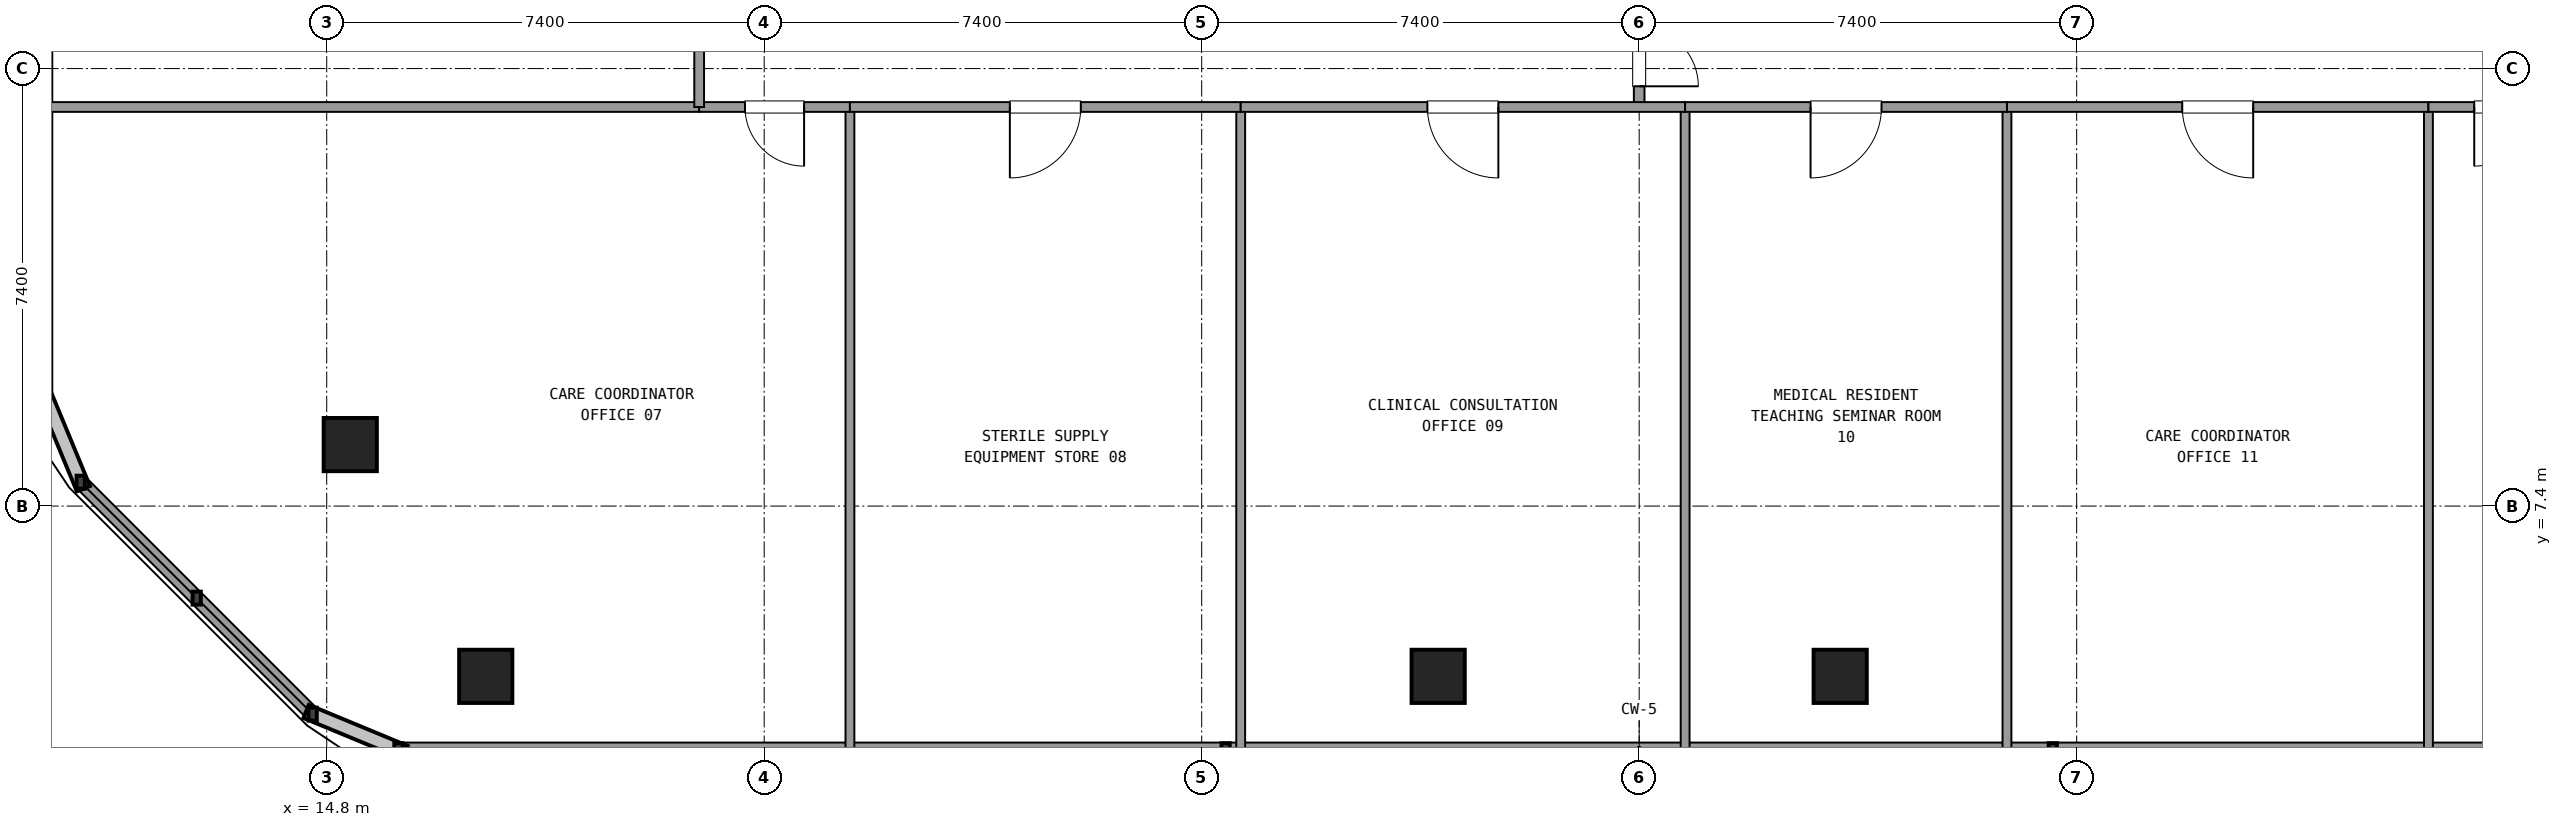
"""IFC4 building model, lengths in metres.
Left out: names, types, materials, properties, quantities, classifications, styles, units other than length and angle.
Written with IfcOpenShell. Run it as: python <this file> out.ifc"""

import sys

from ifc_helpers import new_model, si_unit, direction, frame, frame_2d, origin, origin_2d, place, context, subcontext, project, spatial, rectangle, extrude, element, fill, save


model = new_model("IFC4")
c1 = context("Model", 3, precision=1e-05, world=origin(), true_north=direction((0.0, 1.0)))
c2 = subcontext(c1, "Body", "Model", "MODEL_VIEW")
j1 = project(units=[si_unit("LENGTHUNIT", "METRE"), si_unit("PLANEANGLEUNIT", "RADIAN")], contexts=[c1])
p1 = place(None, origin())
s1 = spatial("IfcSite", under=j1, at=p1, CompositionType="ELEMENT")
p2 = place(p1, origin())
s2 = spatial("IfcBuilding", under=s1, at=p2, CompositionType="ELEMENT")
p3 = place(p2, frame((0.0, 0.0, 225.18)))
s3 = spatial("IfcBuildingStorey", under=s2, at=p3, CompositionType="ELEMENT", Elevation=225.18)
for number, where, z_axis, x_axis in (
    (1, (15.198, 8.44, 0.0), (0.0, 0.0, 1.0), (1.0, 0.0, 0.0)),
    (2, (17.49, 4.52, 0.0), (0.0, 0.0, 1.0), (1.0, 0.0, 0.0)),
    (3, (33.6, 4.52, 0.0), (0.0, 0.0, 1.0), (1.0, 0.0, 0.0)),
    (4, (40.4, 4.52, 0.0), (0.0, 0.0, 1.0), (1.0, 0.0, 0.0)),
):
    element("IfcColumn", number, at=place(p3, frame(where, z_axis=z_axis, x_axis=x_axis)), inside=s3, PredefinedType="COLUMN", context=c2, shape_type="SweptSolid", body=[
        extrude(rectangle(XDim=0.9, YDim=0.9, at=origin_2d()), origin(), (0.0, 0.0, 1.0), 3.6),
    ])
p4 = place(p3, frame((16.013, 3.28, 0.0), z_axis=(0.0, 0.0, 1.0), x_axis=(1.0, 0.0, 0.0)))
e5 = element("IfcWall", 5, at=p4, inside=s3, PredefinedType="SOLIDWALL", context=c2, shape_type="SweptSolid", body=[
    extrude(rectangle(XDim=41.974, YDim=0.24, at=frame_2d((20.987, 0.0))), origin(), (0.0, 0.0, 1.0), 0.85),
])
p5 = place(p3, frame((10.038, 42.545, 0.0), z_axis=(0.0, 0.0, 1.0), x_axis=(0.0, -1.0, 0.0)))
e6 = element("IfcWall", 6, at=p5, inside=s3, PredefinedType="SOLIDWALL", context=c2, shape_type="SweptSolid", body=[
    extrude(rectangle(XDim=33.29, YDim=0.24, at=frame_2d((16.645, 0.0))), origin(), (0.0, 0.0, 1.0), 0.85),
])
p6 = place(p3, frame((10.639, 7.804, 0.0), z_axis=(0.0, 0.0, 1.0), x_axis=(0.707128783731, -0.707084777957, 0.0)))
e7 = element("IfcWall", 7, at=p6, inside=s3, PredefinedType="SOLIDWALL", context=c2, shape_type="SweptSolid", body=[
    extrude(rectangle(XDim=5.548, YDim=0.24, at=frame_2d((2.774, 0.0))), origin(), (0.0, 0.0, 1.0), 0.85),
])
p7 = place(p3, frame((37.0, 14.15, 0.0), z_axis=(0.0, 0.0, 1.0), x_axis=(0.0, 1.0, 0.0)))
e8 = element("IfcWall", 8, at=p7, inside=s3, PredefinedType="PARTITIONING", context=c2, shape_type="SweptSolid", body=[
    extrude(rectangle(XDim=2.7, YDim=0.18, at=frame_2d((1.35, 0.0))), origin(), (0.0, 0.0, 1.0), 2.61),
])
p8 = place(p7, frame((0.35, 0.0, 0.0)))
e9 = element("IfcOpeningElement", 9, at=p8, cuts=e8, PredefinedType="OPENING", context=c2, shape_type="SweptSolid", body=[
    extrude(rectangle(XDim=2.0, YDim=2.2, at=frame_2d((1.0, 1.1))), frame((0.0, 0.1, 0.0), z_axis=(0.0, -1.0, 0.0), x_axis=(1.0, 0.0, 0.0)), (0.0, 0.0, 1.0), 0.2),
])
p9 = place(p3, frame((10.058, 14.15, 0.0), z_axis=(0.0, 0.0, 1.0), x_axis=(1.0, 0.0, 0.0)))
e10 = element("IfcWall", 10, at=p9, inside=s3, PredefinedType="PARTITIONING", context=c2, shape_type="SweptSolid", body=[
    extrude(rectangle(XDim=11.042, YDim=0.165, at=frame_2d((5.521, 0.0))), origin(), (0.0, 0.0, 1.0), 2.61),
])
p10 = place(p3, frame((23.65, 14.15, 0.0), z_axis=(0.0, 0.0, 1.0), x_axis=(0.0, -1.0, 0.0)))
e11 = element("IfcWall", 11, at=p10, inside=s3, PredefinedType="PARTITIONING", context=c2, shape_type="SweptSolid", body=[
    extrude(rectangle(XDim=10.85, YDim=0.15, at=frame_2d((5.425, 0.0))), origin(), (0.0, 0.0, 1.0), 2.61),
])
p11 = place(p3, frame((21.1, 14.15, 0.0), z_axis=(0.0, 0.0, 1.0), x_axis=(1.0, 0.0, 0.0)))
e12 = element("IfcWall", 12, at=p11, inside=s3, PredefinedType="PARTITIONING", context=c2, shape_type="SweptSolid", body=[
    extrude(rectangle(XDim=2.55, YDim=0.165, at=frame_2d((1.275, 0.0))), origin(), (0.0, 0.0, 1.0), 2.61),
])
p12 = place(p11, frame((0.775, 0.0, 0.0)))
e13 = element("IfcOpeningElement", 13, at=p12, cuts=e12, PredefinedType="OPENING", context=c2, shape_type="SweptSolid", body=[
    extrude(rectangle(XDim=1.0, YDim=2.15, at=frame_2d((0.5, 1.075))), frame((0.0, 0.093, 0.0), z_axis=(0.0, -1.0, 0.0), x_axis=(1.0, 0.0, 0.0)), (0.0, 0.0, 1.0), 0.185),
])
p13 = place(p3, frame((30.26, 14.15, 0.0), z_axis=(0.0, 0.0, 1.0), x_axis=(0.0, -1.0, 0.0)))
e14 = element("IfcWall", 14, at=p13, inside=s3, PredefinedType="PARTITIONING", context=c2, shape_type="SweptSolid", body=[
    extrude(rectangle(XDim=10.85, YDim=0.15, at=frame_2d((5.425, 0.0))), origin(), (0.0, 0.0, 1.0), 2.61),
])
p14 = place(p3, frame((23.65, 14.15, 0.0), z_axis=(0.0, 0.0, 1.0), x_axis=(1.0, 0.0, 0.0)))
e15 = element("IfcWall", 15, at=p14, inside=s3, PredefinedType="PARTITIONING", context=c2, shape_type="SweptSolid", body=[
    extrude(rectangle(XDim=6.61, YDim=0.165, at=frame_2d((3.305, 0.0))), origin(), (0.0, 0.0, 1.0), 2.61),
])
p15 = place(p14, frame((2.705, 0.0, 0.0)))
e16 = element("IfcOpeningElement", 16, at=p15, cuts=e15, PredefinedType="OPENING", context=c2, shape_type="SweptSolid", body=[
    extrude(rectangle(XDim=1.2, YDim=2.15, at=frame_2d((0.6, 1.075))), frame((0.0, 0.093, 0.0), z_axis=(0.0, -1.0, 0.0), x_axis=(1.0, 0.0, 0.0)), (0.0, 0.0, 1.0), 0.185),
])
p16 = place(p3, frame((37.777, 14.15, 0.0), z_axis=(0.0, 0.0, 1.0), x_axis=(0.0, -1.0, 0.0)))
e17 = element("IfcWall", 17, at=p16, inside=s3, PredefinedType="PARTITIONING", context=c2, shape_type="SweptSolid", body=[
    extrude(rectangle(XDim=10.85, YDim=0.15, at=frame_2d((5.425, 0.0))), origin(), (0.0, 0.0, 1.0), 2.61),
])
p17 = place(p3, frame((30.26, 14.15, 0.0), z_axis=(0.0, 0.0, 1.0), x_axis=(1.0, 0.0, 0.0)))
e18 = element("IfcWall", 18, at=p17, inside=s3, PredefinedType="PARTITIONING", context=c2, shape_type="SweptSolid", body=[
    extrude(rectangle(XDim=7.517, YDim=0.165, at=frame_2d((3.759, 0.0))), origin(), (0.0, 0.0, 1.0), 2.61),
])
p18 = place(p17, frame((3.158, 0.0, 0.0)))
e19 = element("IfcOpeningElement", 19, at=p18, cuts=e18, PredefinedType="OPENING", context=c2, shape_type="SweptSolid", body=[
    extrude(rectangle(XDim=1.2, YDim=2.15, at=frame_2d((0.6, 1.075))), frame((0.0, 0.093, 0.0), z_axis=(0.0, -1.0, 0.0), x_axis=(1.0, 0.0, 0.0)), (0.0, 0.0, 1.0), 0.185),
])
p19 = place(p3, frame((43.221, 14.15, 0.0), z_axis=(0.0, 0.0, 1.0), x_axis=(0.0, -1.0, 0.0)))
e20 = element("IfcWall", 20, at=p19, inside=s3, PredefinedType="PARTITIONING", context=c2, shape_type="SweptSolid", body=[
    extrude(rectangle(XDim=10.85, YDim=0.15, at=frame_2d((5.425, 0.0))), origin(), (0.0, 0.0, 1.0), 2.61),
])
p20 = place(p3, frame((37.777, 14.15, 0.0), z_axis=(0.0, 0.0, 1.0), x_axis=(1.0, 0.0, 0.0)))
e21 = element("IfcWall", 21, at=p20, inside=s3, PredefinedType="PARTITIONING", context=c2, shape_type="SweptSolid", body=[
    extrude(rectangle(XDim=5.444, YDim=0.165, at=frame_2d((2.722, 0.0))), origin(), (0.0, 0.0, 1.0), 2.61),
])
p21 = place(p20, frame((2.122, 0.0, 0.0)))
e22 = element("IfcOpeningElement", 22, at=p21, cuts=e21, PredefinedType="OPENING", context=c2, shape_type="SweptSolid", body=[
    extrude(rectangle(XDim=1.2, YDim=2.15, at=frame_2d((0.6, 1.075))), frame((0.0, 0.093, 0.0), z_axis=(0.0, -1.0, 0.0), x_axis=(1.0, 0.0, 0.0)), (0.0, 0.0, 1.0), 0.185),
])
p22 = place(p3, frame((50.35, 14.15, 0.0), z_axis=(0.0, 0.0, 1.0), x_axis=(0.0, -1.0, 0.0)))
e23 = element("IfcWall", 23, at=p22, inside=s3, PredefinedType="PARTITIONING", context=c2, shape_type="SweptSolid", body=[
    extrude(rectangle(XDim=10.85, YDim=0.15, at=frame_2d((5.425, 0.0))), origin(), (0.0, 0.0, 1.0), 2.61),
])
p23 = place(p3, frame((43.221, 14.15, 0.0), z_axis=(0.0, 0.0, 1.0), x_axis=(1.0, 0.0, 0.0)))
e24 = element("IfcWall", 24, at=p23, inside=s3, PredefinedType="PARTITIONING", context=c2, shape_type="SweptSolid", body=[
    extrude(rectangle(XDim=7.129, YDim=0.165, at=frame_2d((3.564, 0.0))), origin(), (0.0, 0.0, 1.0), 2.61),
])
p24 = place(p23, frame((2.965, 0.0, 0.0)))
e25 = element("IfcOpeningElement", 25, at=p24, cuts=e24, PredefinedType="OPENING", context=c2, shape_type="SweptSolid", body=[
    extrude(rectangle(XDim=1.2, YDim=2.15, at=frame_2d((0.6, 1.075))), frame((0.0, 0.093, 0.0), z_axis=(0.0, -1.0, 0.0), x_axis=(1.0, 0.0, 0.0)), (0.0, 0.0, 1.0), 0.185),
])
p25 = place(p3, frame((50.35, 14.15, 0.0), z_axis=(0.0, 0.0, 1.0), x_axis=(1.0, 0.0, 0.0)))
e26 = element("IfcWall", 26, at=p25, inside=s3, PredefinedType="PARTITIONING", context=c2, shape_type="SweptSolid", body=[
    extrude(rectangle(XDim=2.55, YDim=0.165, at=frame_2d((1.275, 0.0))), origin(), (0.0, 0.0, 1.0), 2.61),
])
p26 = place(p25, frame((0.775, 0.0, 0.0)))
e27 = element("IfcOpeningElement", 27, at=p26, cuts=e26, PredefinedType="OPENING", context=c2, shape_type="SweptSolid", body=[
    extrude(rectangle(XDim=1.0, YDim=2.15, at=frame_2d((0.5, 1.075))), frame((0.0, 0.093, 0.0), z_axis=(0.0, -1.0, 0.0), x_axis=(1.0, 0.0, 0.0)), (0.0, 0.0, 1.0), 0.185),
])
p27 = place(p3, frame((21.1, 14.15, 0.0), z_axis=(0.0, 0.0, 1.0), x_axis=(0.0, 1.0, 0.0)))
e28 = element("IfcWall", 28, at=p27, inside=s3, PredefinedType="PARTITIONING", context=c2, shape_type="SweptSolid", body=[
    extrude(rectangle(XDim=10.34, YDim=0.165, at=frame_2d((5.17, 0.0))), origin(), (0.0, 0.0, 1.0), 2.61),
])
p28 = place(p27, frame((4.57, 0.0, 0.0)))
e29 = element("IfcOpeningElement", 29, at=p28, cuts=e28, PredefinedType="OPENING", context=c2, shape_type="SweptSolid", body=[
    extrude(rectangle(XDim=1.2, YDim=2.15, at=frame_2d((0.6, 1.075))), frame((0.0, 0.093, 0.0), z_axis=(0.0, -1.0, 0.0), x_axis=(1.0, 0.0, 0.0)), (0.0, 0.0, 1.0), 0.185),
])
p29 = place(p8, frame((2.0, 0.0, 0.0), z_axis=(0.0, 0.0, 1.0), x_axis=(-1.0, 0.0, 0.0)))
e30 = element("IfcDoor", 30, at=p29, inside=s3, OperationType="DOUBLE_DOOR_SINGLE_SWING", PredefinedType="DOOR", context=c2, shape_type="SweptSolid", body=[
    extrude(rectangle(XDim=2.0, YDim=2.2, at=frame_2d((1.0, 1.1))), frame((0.0, 0.025, 0.0), z_axis=(0.0, -1.0, 0.0), x_axis=(1.0, 0.0, 0.0)), (0.0, 0.0, 1.0), 0.05),
])
fill(e9, e30)
p30 = place(p12, frame((1.0, 0.0, 0.0), z_axis=(0.0, 0.0, 1.0), x_axis=(-1.0, 0.0, 0.0)))
e31 = element("IfcDoor", 31, at=p30, inside=s3, OperationType="SINGLE_SWING_RIGHT", PredefinedType="DOOR", context=c2, shape_type="SweptSolid", body=[
    extrude(rectangle(XDim=1.0, YDim=2.15, at=frame_2d((0.5, 1.075))), frame((0.0, 0.025, 0.0), z_axis=(0.0, -1.0, 0.0), x_axis=(1.0, 0.0, 0.0)), (0.0, 0.0, 1.0), 0.05),
])
fill(e13, e31)
p31 = place(p15, frame((1.2, 0.0, 0.0), z_axis=(0.0, 0.0, 1.0), x_axis=(-1.0, 0.0, 0.0)))
e32 = element("IfcDoor", 32, at=p31, inside=s3, OperationType="SINGLE_SWING_LEFT", PredefinedType="DOOR", context=c2, shape_type="SweptSolid", body=[
    extrude(rectangle(XDim=1.2, YDim=2.15, at=frame_2d((0.6, 1.075))), frame((0.0, 0.025, 0.0), z_axis=(0.0, -1.0, 0.0), x_axis=(1.0, 0.0, 0.0)), (0.0, 0.0, 1.0), 0.05),
])
fill(e16, e32)
p32 = place(p18, frame((1.2, 0.0, 0.0), z_axis=(0.0, 0.0, 1.0), x_axis=(-1.0, 0.0, 0.0)))
e33 = element("IfcDoor", 33, at=p32, inside=s3, OperationType="SINGLE_SWING_RIGHT", PredefinedType="DOOR", context=c2, shape_type="SweptSolid", body=[
    extrude(rectangle(XDim=1.2, YDim=2.15, at=frame_2d((0.6, 1.075))), frame((0.0, 0.025, 0.0), z_axis=(0.0, -1.0, 0.0), x_axis=(1.0, 0.0, 0.0)), (0.0, 0.0, 1.0), 0.05),
])
fill(e19, e33)
p33 = place(p21, frame((1.2, 0.0, 0.0), z_axis=(0.0, 0.0, 1.0), x_axis=(-1.0, 0.0, 0.0)))
e34 = element("IfcDoor", 34, at=p33, inside=s3, OperationType="SINGLE_SWING_LEFT", PredefinedType="DOOR", context=c2, shape_type="SweptSolid", body=[
    extrude(rectangle(XDim=1.2, YDim=2.15, at=frame_2d((0.6, 1.075))), frame((0.0, 0.025, 0.0), z_axis=(0.0, -1.0, 0.0), x_axis=(1.0, 0.0, 0.0)), (0.0, 0.0, 1.0), 0.05),
])
fill(e22, e34)
p34 = place(p24, frame((1.2, 0.0, 0.0), z_axis=(0.0, 0.0, 1.0), x_axis=(-1.0, 0.0, 0.0)))
e35 = element("IfcDoor", 35, at=p34, inside=s3, OperationType="SINGLE_SWING_RIGHT", PredefinedType="DOOR", context=c2, shape_type="SweptSolid", body=[
    extrude(rectangle(XDim=1.2, YDim=2.15, at=frame_2d((0.6, 1.075))), frame((0.0, 0.025, 0.0), z_axis=(0.0, -1.0, 0.0), x_axis=(1.0, 0.0, 0.0)), (0.0, 0.0, 1.0), 0.05),
])
fill(e25, e35)
p35 = place(p26, frame((1.0, 0.0, 0.0), z_axis=(0.0, 0.0, 1.0), x_axis=(-1.0, 0.0, 0.0)))
e36 = element("IfcDoor", 36, at=p35, inside=s3, OperationType="SINGLE_SWING_LEFT", PredefinedType="DOOR", context=c2, shape_type="SweptSolid", body=[
    extrude(rectangle(XDim=1.0, YDim=2.15, at=frame_2d((0.5, 1.075))), frame((0.0, 0.025, 0.0), z_axis=(0.0, -1.0, 0.0), x_axis=(1.0, 0.0, 0.0)), (0.0, 0.0, 1.0), 0.05),
])
fill(e27, e36)
save(model, sys.argv[1])
